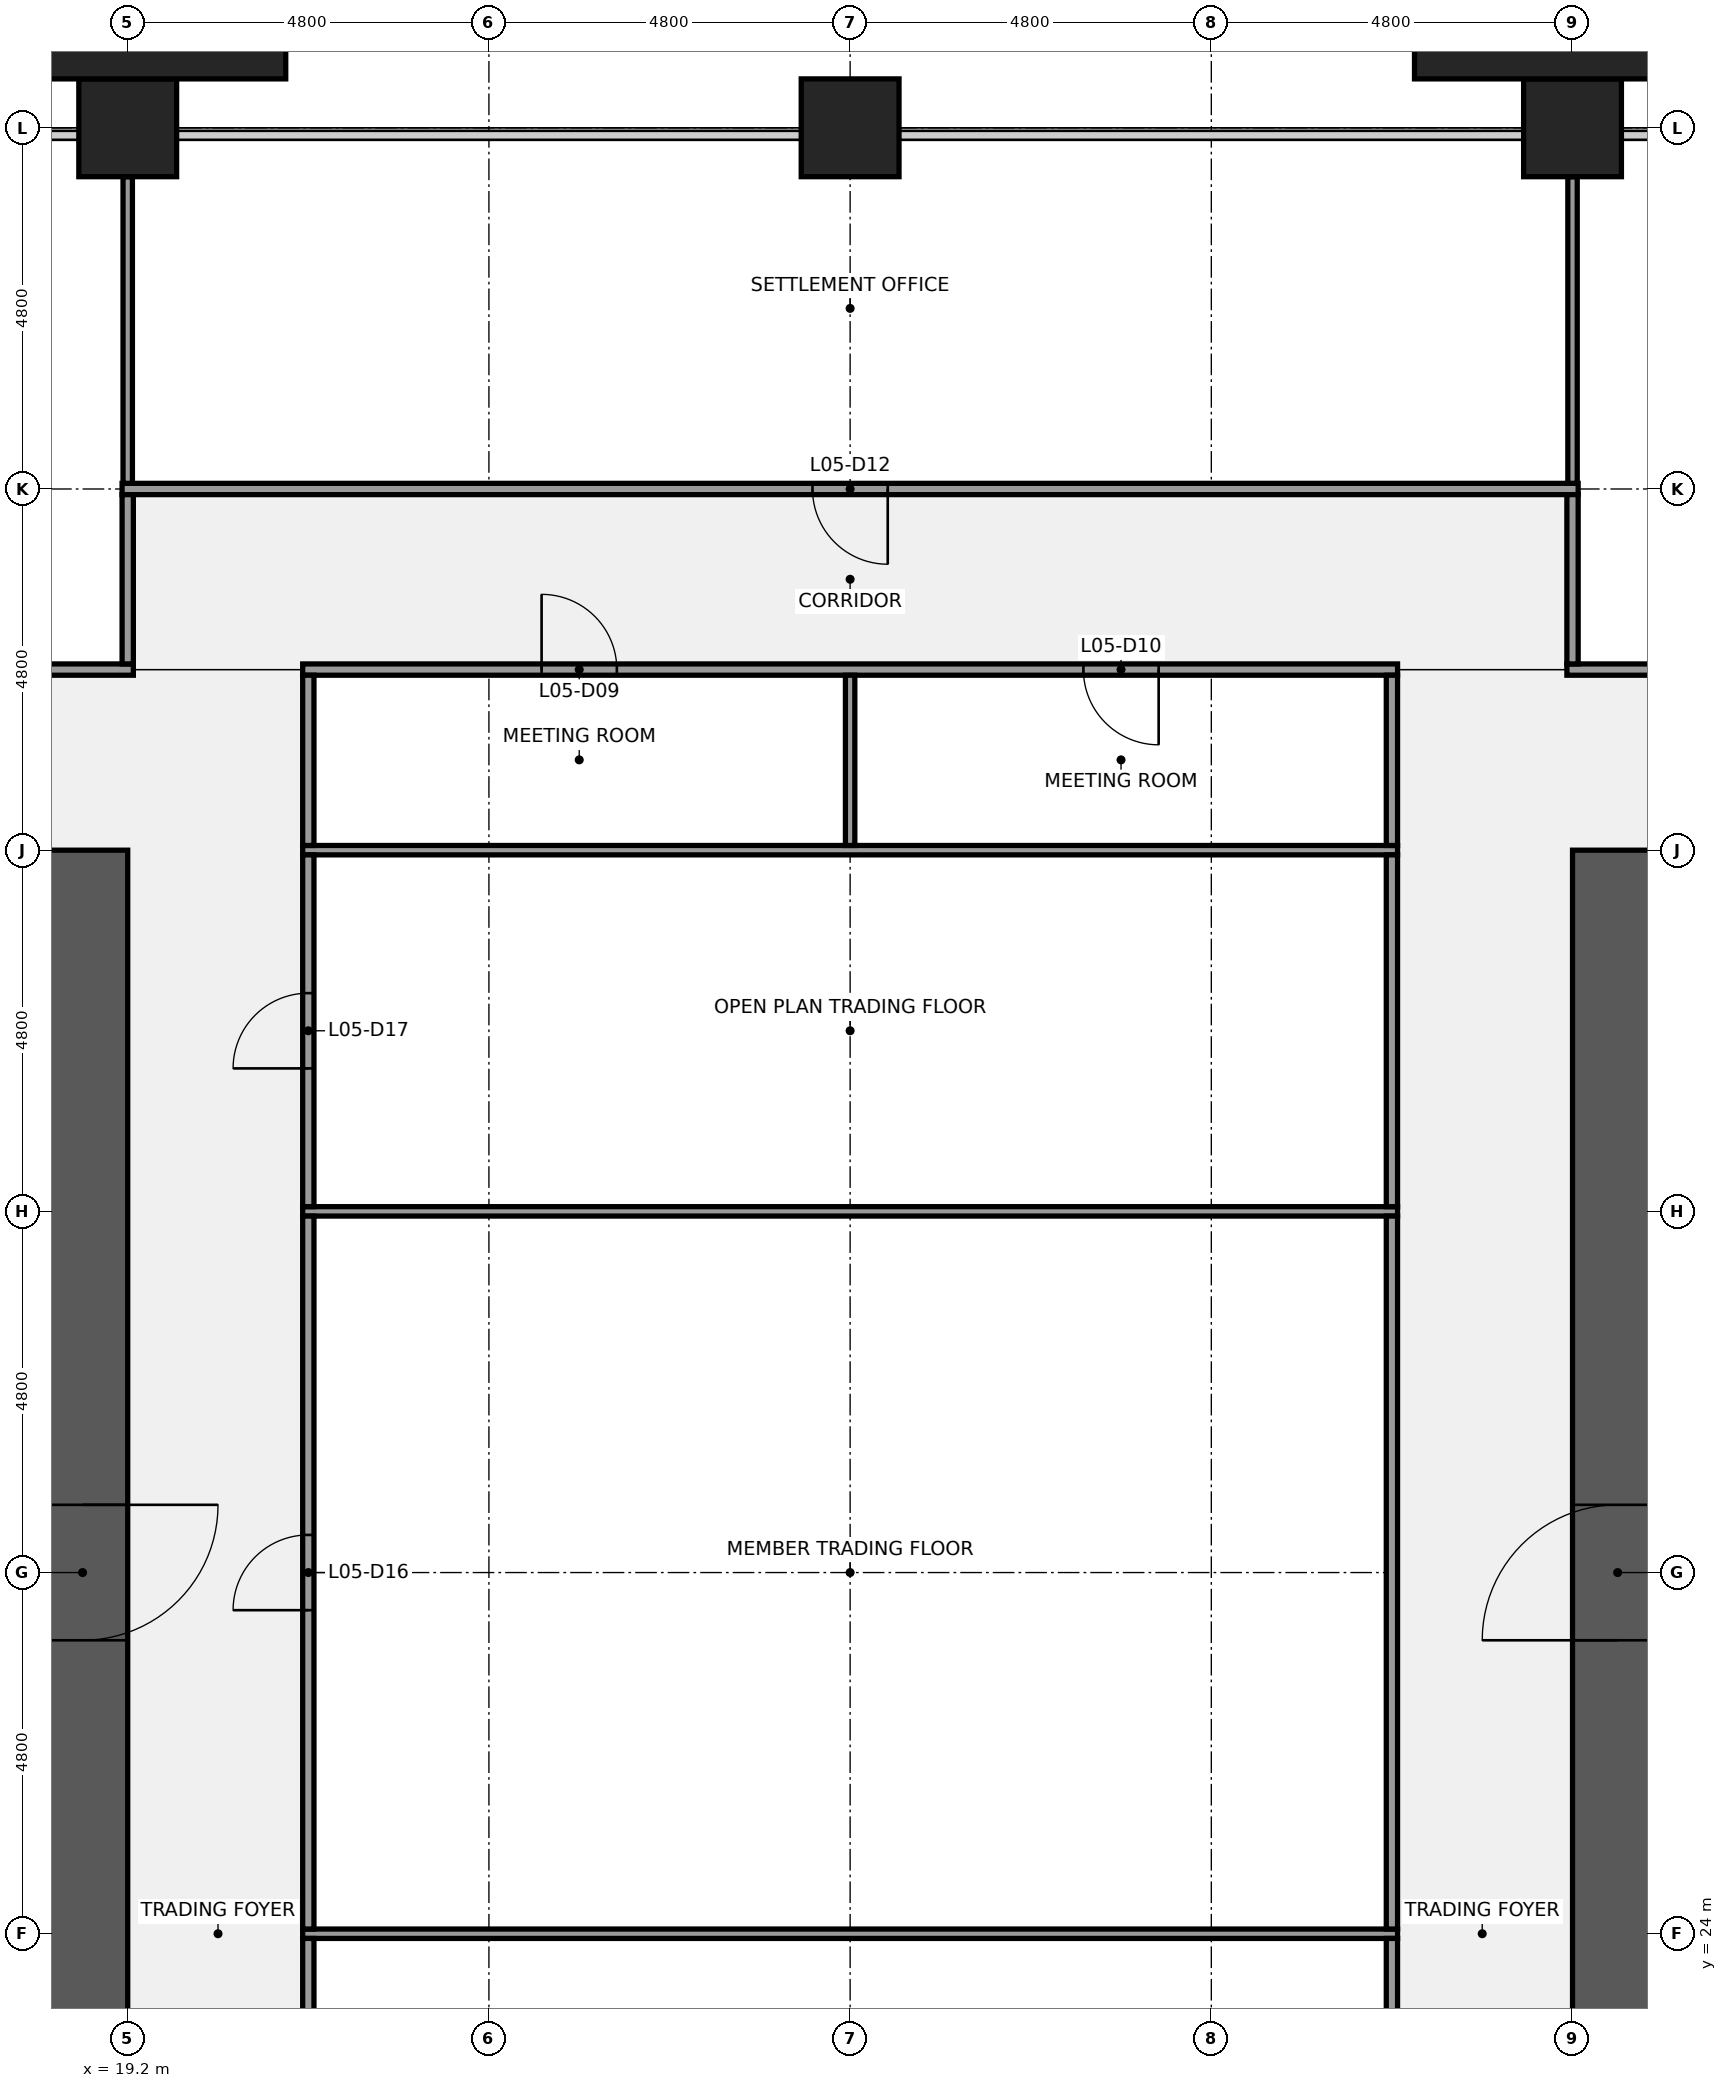
"""IFC4 building model, lengths in metres.
Left out: names, types, materials, properties, quantities, classifications, styles, units other than length and angle.
Written with IfcOpenShell. Run it as: python <this file> out.ifc"""

import sys

from ifc_helpers import new_model, si_unit, direction, frame, frame_2d, origin, origin_2d, place, context, subcontext, project, spatial, rectangle, extrude, element, fill, save


model = new_model("IFC4")
c1 = context("Model", 3, precision=1e-05, world=origin(), true_north=direction((0.0, 1.0)))
c2 = subcontext(c1, "Body", "Model", "MODEL_VIEW")
j1 = project(units=[si_unit("LENGTHUNIT", "METRE"), si_unit("PLANEANGLEUNIT", "RADIAN")], contexts=[c1])
p1 = place(None, origin())
s1 = spatial("IfcSite", under=j1, at=p1, CompositionType="ELEMENT")
p2 = place(p1, origin())
s2 = spatial("IfcBuilding", under=s1, at=p2, CompositionType="ELEMENT")
p3 = place(p2, frame((0.0, 0.0, 30.2)))
s3 = spatial("IfcBuildingStorey", under=s2, at=p3, CompositionType="ELEMENT", Elevation=30.2)
for number, where, z_axis, x_axis in (
    (1, (19.2, 48.0, 0.0), (0.0, 0.0, 1.0), (1.0, 0.0, 0.0)),
    (2, (28.8, 48.0, 0.0), (0.0, 0.0, 1.0), (1.0, 0.0, 0.0)),
    (3, (38.4, 48.0, 0.0), (0.0, 0.0, 1.0), (1.0, 0.0, 0.0)),
):
    element("IfcColumn", number, at=place(p3, frame(where, z_axis=z_axis, x_axis=x_axis)), inside=s3, PredefinedType="COLUMN", context=c2, shape_type="SweptSolid", body=[
        extrude(rectangle(XDim=1.3, YDim=1.3, at=origin_2d()), origin(), (0.0, 0.0, 1.0), 4.4),
    ])
p4 = place(p3, frame((18.6, 38.4, 0.0), z_axis=(0.0, 0.0, 1.0), x_axis=(0.0, -1.0, 0.0)))
e4 = element("IfcWall", 4, at=p4, inside=s3, PredefinedType="SHEAR", context=c2, shape_type="SweptSolid", body=[
    extrude(rectangle(XDim=28.8, YDim=1.2, at=frame_2d((14.4, 0.0))), origin(), (0.0, 0.0, 1.0), 4.24),
])
p5 = place(p4, frame((18.3, 0.0, 0.0)))
e5 = element("IfcOpeningElement", 5, at=p5, cuts=e4, PredefinedType="OPENING", context=c2, shape_type="SweptSolid", body=[
    extrude(rectangle(XDim=1.8, YDim=2.1, at=frame_2d((0.9, 1.05))), frame((0.0, 0.61, 0.0), z_axis=(0.0, -1.0, 0.0), x_axis=(1.0, 0.0, 0.0)), (0.0, 0.0, 1.0), 1.22),
])
p6 = place(p4, frame((8.7, 0.0, 0.0)))
e6 = element("IfcOpeningElement", 6, at=p6, cuts=e4, PredefinedType="OPENING", context=c2, shape_type="SweptSolid", body=[
    extrude(rectangle(XDim=1.8, YDim=2.1, at=frame_2d((0.9, 1.05))), frame((0.0, 0.61, 0.0), z_axis=(0.0, -1.0, 0.0), x_axis=(1.0, 0.0, 0.0)), (0.0, 0.0, 1.0), 1.22),
])
p7 = place(p3, frame((39.0, 9.6, 0.0), z_axis=(0.0, 0.0, 1.0), x_axis=(0.0, 1.0, 0.0)))
e7 = element("IfcWall", 7, at=p7, inside=s3, PredefinedType="SHEAR", context=c2, shape_type="SweptSolid", body=[
    extrude(rectangle(XDim=28.8, YDim=1.2, at=frame_2d((14.4, 0.0))), origin(), (0.0, 0.0, 1.0), 4.24),
])
p8 = place(p7, frame((8.7, 0.0, 0.0)))
e8 = element("IfcOpeningElement", 8, at=p8, cuts=e7, PredefinedType="OPENING", context=c2, shape_type="SweptSolid", body=[
    extrude(rectangle(XDim=1.8, YDim=2.1, at=frame_2d((0.9, 1.05))), frame((0.0, 0.61, 0.0), z_axis=(0.0, -1.0, 0.0), x_axis=(1.0, 0.0, 0.0)), (0.0, 0.0, 1.0), 1.22),
])
p9 = place(p7, frame((18.3, 0.0, 0.0)))
e9 = element("IfcOpeningElement", 9, at=p9, cuts=e7, PredefinedType="OPENING", context=c2, shape_type="SweptSolid", body=[
    extrude(rectangle(XDim=1.8, YDim=2.1, at=frame_2d((0.9, 1.05))), frame((0.0, 0.61, 0.0), z_axis=(0.0, -1.0, 0.0), x_axis=(1.0, 0.0, 0.0)), (0.0, 0.0, 1.0), 1.22),
])
for number, where, z_axis, x_axis in (
    (10, (21.525, 24.0, 0.0), (0.0, 0.0, 1.0), (1.0, 0.0, 0.0)),
    (11, (21.525, 33.6, 0.0), (0.0, 0.0, 1.0), (1.0, 0.0, 0.0)),
    (12, (21.525, 38.4, 0.0), (0.0, 0.0, 1.0), (1.0, 0.0, 0.0)),
):
    element("IfcWall", number, at=place(p3, frame(where, z_axis=z_axis, x_axis=x_axis)), inside=s3, PredefinedType="PARTITIONING", context=c2, shape_type="SweptSolid", body=[
        extrude(rectangle(XDim=14.55, YDim=0.125, at=frame_2d((7.275, 0.0))), origin(), (0.0, 0.0, 1.0), 3.25),
    ])
p10 = place(p3, frame((14.325, 40.8, 0.0), z_axis=(0.0, 0.0, 1.0), x_axis=(1.0, 0.0, 0.0)))
e13 = element("IfcWall", 13, at=p10, inside=s3, PredefinedType="PARTITIONING", context=c2, shape_type="SweptSolid", body=[
    extrude(rectangle(XDim=4.95, YDim=0.15, at=frame_2d((2.475, 0.0))), origin(), (0.0, 0.0, 1.0), 3.25),
])
p11 = place(p10, frame((1.975, 0.0, 0.0)))
e14 = element("IfcOpeningElement", 14, at=p11, cuts=e13, PredefinedType="OPENING", context=c2, shape_type="SweptSolid", body=[
    extrude(rectangle(XDim=1.0, YDim=2.1, at=frame_2d((0.5, 1.05))), frame((0.0, 0.085, 0.0), z_axis=(0.0, -1.0, 0.0), x_axis=(1.0, 0.0, 0.0)), (0.0, 0.0, 1.0), 0.17),
])
p12 = place(p3, frame((21.525, 40.8, 0.0), z_axis=(0.0, 0.0, 1.0), x_axis=(1.0, 0.0, 0.0)))
e15 = element("IfcWall", 15, at=p12, inside=s3, PredefinedType="PARTITIONING", context=c2, shape_type="SweptSolid", body=[
    extrude(rectangle(XDim=14.55, YDim=0.15, at=frame_2d((7.275, 0.0))), origin(), (0.0, 0.0, 1.0), 3.25),
])
p13 = place(p12, frame((3.175, 0.0, 0.0)))
e16 = element("IfcOpeningElement", 16, at=p13, cuts=e15, PredefinedType="OPENING", context=c2, shape_type="SweptSolid", body=[
    extrude(rectangle(XDim=1.0, YDim=2.1, at=frame_2d((0.5, 1.05))), frame((0.0, 0.085, 0.0), z_axis=(0.0, -1.0, 0.0), x_axis=(1.0, 0.0, 0.0)), (0.0, 0.0, 1.0), 0.17),
])
p14 = place(p12, frame((10.375, 0.0, 0.0)))
e17 = element("IfcOpeningElement", 17, at=p14, cuts=e15, PredefinedType="OPENING", context=c2, shape_type="SweptSolid", body=[
    extrude(rectangle(XDim=1.0, YDim=2.1, at=frame_2d((0.5, 1.05))), frame((0.0, 0.085, 0.0), z_axis=(0.0, -1.0, 0.0), x_axis=(1.0, 0.0, 0.0)), (0.0, 0.0, 1.0), 0.17),
])
p15 = place(p3, frame((38.325, 40.8, 0.0), z_axis=(0.0, 0.0, 1.0), x_axis=(1.0, 0.0, 0.0)))
e18 = element("IfcWall", 18, at=p15, inside=s3, PredefinedType="PARTITIONING", context=c2, shape_type="SweptSolid", body=[
    extrude(rectangle(XDim=4.95, YDim=0.15, at=frame_2d((2.475, 0.0))), origin(), (0.0, 0.0, 1.0), 3.25),
])
p16 = place(p15, frame((1.975, 0.0, 0.0)))
e19 = element("IfcOpeningElement", 19, at=p16, cuts=e18, PredefinedType="OPENING", context=c2, shape_type="SweptSolid", body=[
    extrude(rectangle(XDim=1.0, YDim=2.1, at=frame_2d((0.5, 1.05))), frame((0.0, 0.085, 0.0), z_axis=(0.0, -1.0, 0.0), x_axis=(1.0, 0.0, 0.0)), (0.0, 0.0, 1.0), 0.17),
])
p17 = place(p3, frame((19.125, 43.2, 0.0), z_axis=(0.0, 0.0, 1.0), x_axis=(1.0, 0.0, 0.0)))
e20 = element("IfcWall", 20, at=p17, inside=s3, PredefinedType="PARTITIONING", context=c2, shape_type="SweptSolid", body=[
    extrude(rectangle(XDim=19.35, YDim=0.15, at=frame_2d((9.675, 0.0))), origin(), (0.0, 0.0, 1.0), 3.25),
])
p18 = place(p17, frame((9.175, 0.0, 0.0)))
e21 = element("IfcOpeningElement", 21, at=p18, cuts=e20, PredefinedType="OPENING", context=c2, shape_type="SweptSolid", body=[
    extrude(rectangle(XDim=1.0, YDim=2.1, at=frame_2d((0.5, 1.05))), frame((0.0, 0.085, 0.0), z_axis=(0.0, -1.0, 0.0), x_axis=(1.0, 0.0, 0.0)), (0.0, 0.0, 1.0), 0.17),
])
p19 = place(p3, frame((19.2, 43.275, 0.0), z_axis=(0.0, 0.0, 1.0), x_axis=(0.0, 1.0, 0.0)))
e22 = element("IfcWall", 22, at=p19, inside=s3, PredefinedType="PARTITIONING", context=c2, shape_type="SweptSolid", body=[
    extrude(rectangle(XDim=4.075, YDim=0.125, at=frame_2d((2.038, 0.0))), origin(), (0.0, 0.0, 1.0), 3.25),
])
p20 = place(p3, frame((19.2, 40.875, 0.0), z_axis=(0.0, 0.0, 1.0), x_axis=(0.0, 1.0, 0.0)))
e23 = element("IfcWall", 23, at=p20, inside=s3, PredefinedType="PARTITIONING", context=c2, shape_type="SweptSolid", body=[
    extrude(rectangle(XDim=2.25, YDim=0.15, at=frame_2d((1.125, 0.0))), origin(), (0.0, 0.0, 1.0), 3.25),
])
p21 = place(p3, frame((21.6, 14.462, 0.0), z_axis=(0.0, 0.0, 1.0), x_axis=(0.0, 1.0, 0.0)))
e24 = element("IfcWall", 24, at=p21, inside=s3, PredefinedType="PARTITIONING", context=c2, shape_type="SweptSolid", body=[
    extrude(rectangle(XDim=9.475, YDim=0.15, at=frame_2d((4.738, 0.0))), origin(), (0.0, 0.0, 1.0), 3.25),
])
p22 = place(p21, frame((4.238, 0.0, 0.0)))
e25 = element("IfcOpeningElement", 25, at=p22, cuts=e24, PredefinedType="OPENING", context=c2, shape_type="SweptSolid", body=[
    extrude(rectangle(XDim=1.0, YDim=2.1, at=frame_2d((0.5, 1.05))), frame((0.0, 0.085, 0.0), z_axis=(0.0, -1.0, 0.0), x_axis=(1.0, 0.0, 0.0)), (0.0, 0.0, 1.0), 0.17),
])
p23 = place(p3, frame((21.6, 24.062, 0.0), z_axis=(0.0, 0.0, 1.0), x_axis=(0.0, 1.0, 0.0)))
e26 = element("IfcWall", 26, at=p23, inside=s3, PredefinedType="PARTITIONING", context=c2, shape_type="SweptSolid", body=[
    extrude(rectangle(XDim=9.475, YDim=0.15, at=frame_2d((4.738, 0.0))), origin(), (0.0, 0.0, 1.0), 3.25),
])
p24 = place(p23, frame((4.238, 0.0, 0.0)))
e27 = element("IfcOpeningElement", 27, at=p24, cuts=e26, PredefinedType="OPENING", context=c2, shape_type="SweptSolid", body=[
    extrude(rectangle(XDim=1.0, YDim=2.1, at=frame_2d((0.5, 1.05))), frame((0.0, 0.085, 0.0), z_axis=(0.0, -1.0, 0.0), x_axis=(1.0, 0.0, 0.0)), (0.0, 0.0, 1.0), 0.17),
])
p25 = place(p3, frame((21.6, 33.663, 0.0), z_axis=(0.0, 0.0, 1.0), x_axis=(0.0, 1.0, 0.0)))
e28 = element("IfcWall", 28, at=p25, inside=s3, PredefinedType="PARTITIONING", context=c2, shape_type="SweptSolid", body=[
    extrude(rectangle(XDim=4.675, YDim=0.15, at=frame_2d((2.337, 0.0))), origin(), (0.0, 0.0, 1.0), 3.25),
])
p26 = place(p25, frame((1.837, 0.0, 0.0)))
e29 = element("IfcOpeningElement", 29, at=p26, cuts=e28, PredefinedType="OPENING", context=c2, shape_type="SweptSolid", body=[
    extrude(rectangle(XDim=1.0, YDim=2.1, at=frame_2d((0.5, 1.05))), frame((0.0, 0.085, 0.0), z_axis=(0.0, -1.0, 0.0), x_axis=(1.0, 0.0, 0.0)), (0.0, 0.0, 1.0), 0.17),
])
p27 = place(p3, frame((21.6, 38.462, 0.0), z_axis=(0.0, 0.0, 1.0), x_axis=(0.0, 1.0, 0.0)))
e30 = element("IfcWall", 30, at=p27, inside=s3, PredefinedType="PARTITIONING", context=c2, shape_type="SweptSolid", body=[
    extrude(rectangle(XDim=2.263, YDim=0.15, at=frame_2d((1.131, 0.0))), origin(), (0.0, 0.0, 1.0), 3.25),
])
p28 = place(p3, frame((28.8, 38.462, 0.0), z_axis=(0.0, 0.0, 1.0), x_axis=(0.0, 1.0, 0.0)))
e31 = element("IfcWall", 31, at=p28, inside=s3, PredefinedType="PARTITIONING", context=c2, shape_type="SweptSolid", body=[
    extrude(rectangle(XDim=2.263, YDim=0.125, at=frame_2d((1.131, 0.0))), origin(), (0.0, 0.0, 1.0), 3.25),
])
for number, where, z_axis, x_axis in (
    (32, (36.0, 14.462, 0.0), (0.0, 0.0, 1.0), (0.0, 1.0, 0.0)),
    (33, (36.0, 24.062, 0.0), (0.0, 0.0, 1.0), (0.0, 1.0, 0.0)),
):
    element("IfcWall", number, at=place(p3, frame(where, z_axis=z_axis, x_axis=x_axis)), inside=s3, PredefinedType="PARTITIONING", context=c2, shape_type="SweptSolid", body=[
        extrude(rectangle(XDim=9.475, YDim=0.15, at=frame_2d((4.738, 0.0))), origin(), (0.0, 0.0, 1.0), 3.25),
    ])
p29 = place(p3, frame((36.0, 33.663, 0.0), z_axis=(0.0, 0.0, 1.0), x_axis=(0.0, 1.0, 0.0)))
e34 = element("IfcWall", 34, at=p29, inside=s3, PredefinedType="PARTITIONING", context=c2, shape_type="SweptSolid", body=[
    extrude(rectangle(XDim=4.675, YDim=0.15, at=frame_2d((2.337, 0.0))), origin(), (0.0, 0.0, 1.0), 3.25),
])
p30 = place(p3, frame((36.0, 38.462, 0.0), z_axis=(0.0, 0.0, 1.0), x_axis=(0.0, 1.0, 0.0)))
e35 = element("IfcWall", 35, at=p30, inside=s3, PredefinedType="PARTITIONING", context=c2, shape_type="SweptSolid", body=[
    extrude(rectangle(XDim=2.263, YDim=0.15, at=frame_2d((1.131, 0.0))), origin(), (0.0, 0.0, 1.0), 3.25),
])
p31 = place(p3, frame((38.4, 43.275, 0.0), z_axis=(0.0, 0.0, 1.0), x_axis=(0.0, 1.0, 0.0)))
e36 = element("IfcWall", 36, at=p31, inside=s3, PredefinedType="PARTITIONING", context=c2, shape_type="SweptSolid", body=[
    extrude(rectangle(XDim=4.075, YDim=0.125, at=frame_2d((2.038, 0.0))), origin(), (0.0, 0.0, 1.0), 3.25),
])
p32 = place(p3, frame((38.4, 40.875, 0.0), z_axis=(0.0, 0.0, 1.0), x_axis=(0.0, 1.0, 0.0)))
e37 = element("IfcWall", 37, at=p32, inside=s3, PredefinedType="PARTITIONING", context=c2, shape_type="SweptSolid", body=[
    extrude(rectangle(XDim=2.25, YDim=0.15, at=frame_2d((1.125, 0.0))), origin(), (0.0, 0.0, 1.0), 3.25),
])
for number, where, z_axis, x_axis in (
    (38, (19.2, 49.075, 0.0), (0.0, 0.0, 1.0), (1.0, 0.0, 0.0)),
    (39, (38.4, 49.075, 0.0), (0.0, 0.0, 1.0), (1.0, 0.0, 0.0)),
):
    element("IfcColumn", number, at=place(p3, frame(where, z_axis=z_axis, x_axis=x_axis)), inside=s3, PredefinedType="PILASTER", context=c2, shape_type="SweptSolid", body=[
        extrude(rectangle(XDim=4.2, YDim=0.85, at=origin_2d()), origin(), (0.0, 0.0, 1.0), 4.4),
    ])
p33 = place(p6, origin())
e40 = element("IfcDoor", 40, at=p33, inside=s3, OperationType="DOUBLE_DOOR_SINGLE_SWING", PredefinedType="DOOR", context=c2, shape_type="SweptSolid", body=[
    extrude(rectangle(XDim=1.8, YDim=2.1, at=frame_2d((0.9, 1.05))), frame((0.0, 0.025, 0.0), z_axis=(0.0, -1.0, 0.0), x_axis=(1.0, 0.0, 0.0)), (0.0, 0.0, 1.0), 0.05),
])
fill(e6, e40)
p34 = place(p9, origin())
e41 = element("IfcDoor", 41, at=p34, inside=s3, OperationType="DOUBLE_DOOR_SINGLE_SWING", PredefinedType="DOOR", context=c2, shape_type="SweptSolid", body=[
    extrude(rectangle(XDim=1.8, YDim=2.1, at=frame_2d((0.9, 1.05))), frame((0.0, 0.025, 0.0), z_axis=(0.0, -1.0, 0.0), x_axis=(1.0, 0.0, 0.0)), (0.0, 0.0, 1.0), 0.05),
])
fill(e9, e41)
p35 = place(p13, origin())
e42 = element("IfcDoor", 42, at=p35, inside=s3, OperationType="SINGLE_SWING_LEFT", PredefinedType="DOOR", context=c2, shape_type="SweptSolid", body=[
    extrude(rectangle(XDim=1.0, YDim=2.1, at=frame_2d((0.5, 1.05))), frame((0.0, 0.025, 0.0), z_axis=(0.0, -1.0, 0.0), x_axis=(1.0, 0.0, 0.0)), (0.0, 0.0, 1.0), 0.05),
])
fill(e16, e42)
p36 = place(p14, origin())
e43 = element("IfcDoor", 43, at=p36, inside=s3, OperationType="SINGLE_SWING_RIGHT", PredefinedType="DOOR", context=c2, shape_type="SweptSolid", body=[
    extrude(rectangle(XDim=1.0, YDim=2.1, at=frame_2d((0.5, 1.05))), frame((0.0, 0.025, 0.0), z_axis=(0.0, -1.0, 0.0), x_axis=(1.0, 0.0, 0.0)), (0.0, 0.0, 1.0), 0.05),
])
fill(e17, e43)
p37 = place(p18, origin())
e44 = element("IfcDoor", 44, at=p37, inside=s3, OperationType="SINGLE_SWING_RIGHT", PredefinedType="DOOR", context=c2, shape_type="SweptSolid", body=[
    extrude(rectangle(XDim=1.0, YDim=2.1, at=frame_2d((0.5, 1.05))), frame((0.0, 0.025, 0.0), z_axis=(0.0, -1.0, 0.0), x_axis=(1.0, 0.0, 0.0)), (0.0, 0.0, 1.0), 0.05),
])
fill(e21, e44)
p38 = place(p24, origin())
e45 = element("IfcDoor", 45, at=p38, inside=s3, OperationType="SINGLE_SWING_LEFT", PredefinedType="DOOR", context=c2, shape_type="SweptSolid", body=[
    extrude(rectangle(XDim=1.0, YDim=2.1, at=frame_2d((0.5, 1.05))), frame((0.0, 0.025, 0.0), z_axis=(0.0, -1.0, 0.0), x_axis=(1.0, 0.0, 0.0)), (0.0, 0.0, 1.0), 0.05),
])
fill(e27, e45)
p39 = place(p26, origin())
e46 = element("IfcDoor", 46, at=p39, inside=s3, OperationType="SINGLE_SWING_LEFT", PredefinedType="DOOR", context=c2, shape_type="SweptSolid", body=[
    extrude(rectangle(XDim=1.0, YDim=2.1, at=frame_2d((0.5, 1.05))), frame((0.0, 0.025, 0.0), z_axis=(0.0, -1.0, 0.0), x_axis=(1.0, 0.0, 0.0)), (0.0, 0.0, 1.0), 0.05),
])
fill(e29, e46)
save(model, sys.argv[1])
